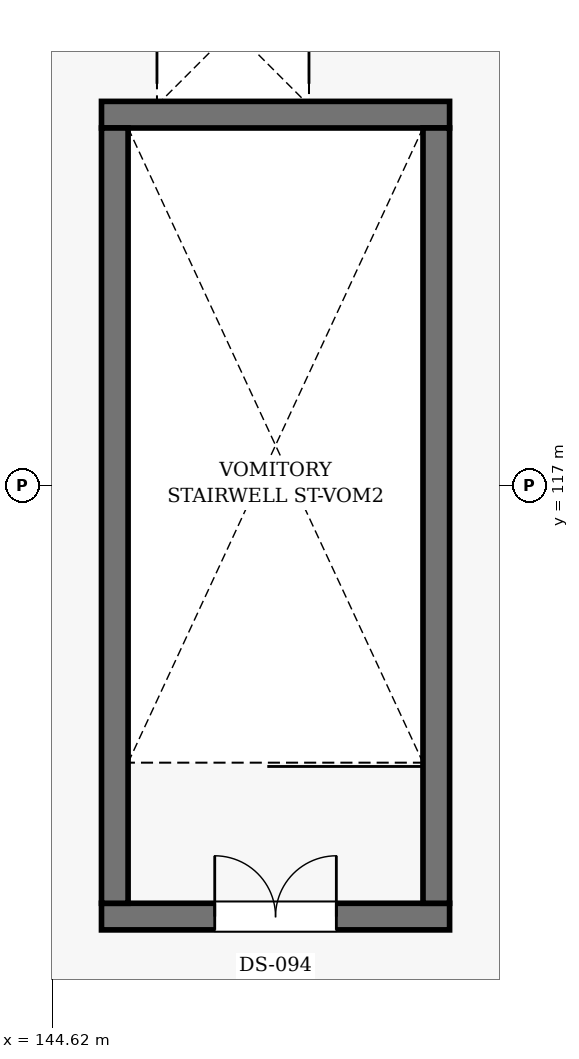
"""IFC4 building model, lengths in metres.
Left out: names, types, materials, properties, quantities, classifications, styles, units other than length and angle.
Written with IfcOpenShell. Run it as: python <this file> out.ifc"""

import sys

from ifc_helpers import new_model, si_unit, direction, frame, frame_2d, origin, place, context, subcontext, project, spatial, rectangle, extrude, element, fill, save


model = new_model("IFC4")
c1 = context("Model", 3, precision=1e-05, world=origin(), true_north=direction((0.0, 1.0)))
c2 = subcontext(c1, "Body", "Model", "MODEL_VIEW")
j1 = project(units=[si_unit("LENGTHUNIT", "METRE"), si_unit("PLANEANGLEUNIT", "RADIAN")], contexts=[c1])
p1 = place(None, origin())
s1 = spatial("IfcSite", under=j1, at=p1, CompositionType="ELEMENT")
p2 = place(p1, origin())
s2 = spatial("IfcBuilding", under=s1, at=p2, CompositionType="ELEMENT")
p3 = place(p2, frame((0.0, 0.0, 5.4)))
s3 = spatial("IfcBuildingStorey", under=s2, at=p3, CompositionType="ELEMENT", Elevation=5.4)
p4 = place(p3, frame((145.27, 111.325, 0.0), z_axis=(0.0, 0.0, 1.0), x_axis=(1.0, 0.0, 0.0)))
e1 = element("IfcWall", 1, at=p4, inside=s3, PredefinedType="SHEAR", context=c2, shape_type="SweptSolid", body=[
    extrude(rectangle(XDim=4.58, YDim=0.35, at=frame_2d((2.29, 0.0))), origin(), (0.0, 0.0, 1.0), 5.4),
])
p5 = place(p4, frame((1.49, 0.0, 0.0)))
e2 = element("IfcOpeningElement", 2, at=p5, cuts=e1, PredefinedType="OPENING", context=c2, shape_type="SweptSolid", body=[
    extrude(rectangle(XDim=1.6, YDim=2.2, at=frame_2d((0.8, 1.1))), frame((0.0, 0.185, 0.0), z_axis=(0.0, -1.0, 0.0), x_axis=(1.0, 0.0, 0.0)), (0.0, 0.0, 1.0), 0.37),
])
p6 = place(p3, frame((149.85, 121.875, 0.0), z_axis=(0.0, 0.0, 1.0), x_axis=(-1.0, 0.0, 0.0)))
e3 = element("IfcWall", 3, at=p6, inside=s3, PredefinedType="SHEAR", context=c2, shape_type="SweptSolid", body=[
    extrude(rectangle(XDim=4.58, YDim=0.35, at=frame_2d((2.29, 0.0))), origin(), (0.0, 0.0, 1.0), 5.4),
])
for number, where, z_axis, x_axis in (
    (4, (145.445, 121.7, 0.0), (0.0, 0.0, 1.0), (0.0, -1.0, 0.0)),
    (5, (149.675, 111.5, 0.0), (0.0, 0.0, 1.0), (0.0, 1.0, 0.0)),
):
    element("IfcWall", number, at=place(p3, frame(where, z_axis=z_axis, x_axis=x_axis)), inside=s3, PredefinedType="SHEAR", context=c2, shape_type="SweptSolid", body=[
        extrude(rectangle(XDim=10.2, YDim=0.35, at=frame_2d((5.1, 0.0))), origin(), (0.0, 0.0, 1.0), 5.4),
    ])
p7 = place(p5, origin())
e6 = element("IfcDoor", 6, at=p7, inside=s3, OperationType="DOUBLE_DOOR_SINGLE_SWING", PredefinedType="DOOR", context=c2, shape_type="SweptSolid", body=[
    extrude(rectangle(XDim=1.6, YDim=2.2, at=frame_2d((0.8, 1.1))), frame((0.0, 0.025, 0.0), z_axis=(0.0, -1.0, 0.0), x_axis=(1.0, 0.0, 0.0)), (0.0, 0.0, 1.0), 0.05),
])
fill(e2, e6)
save(model, sys.argv[1])
